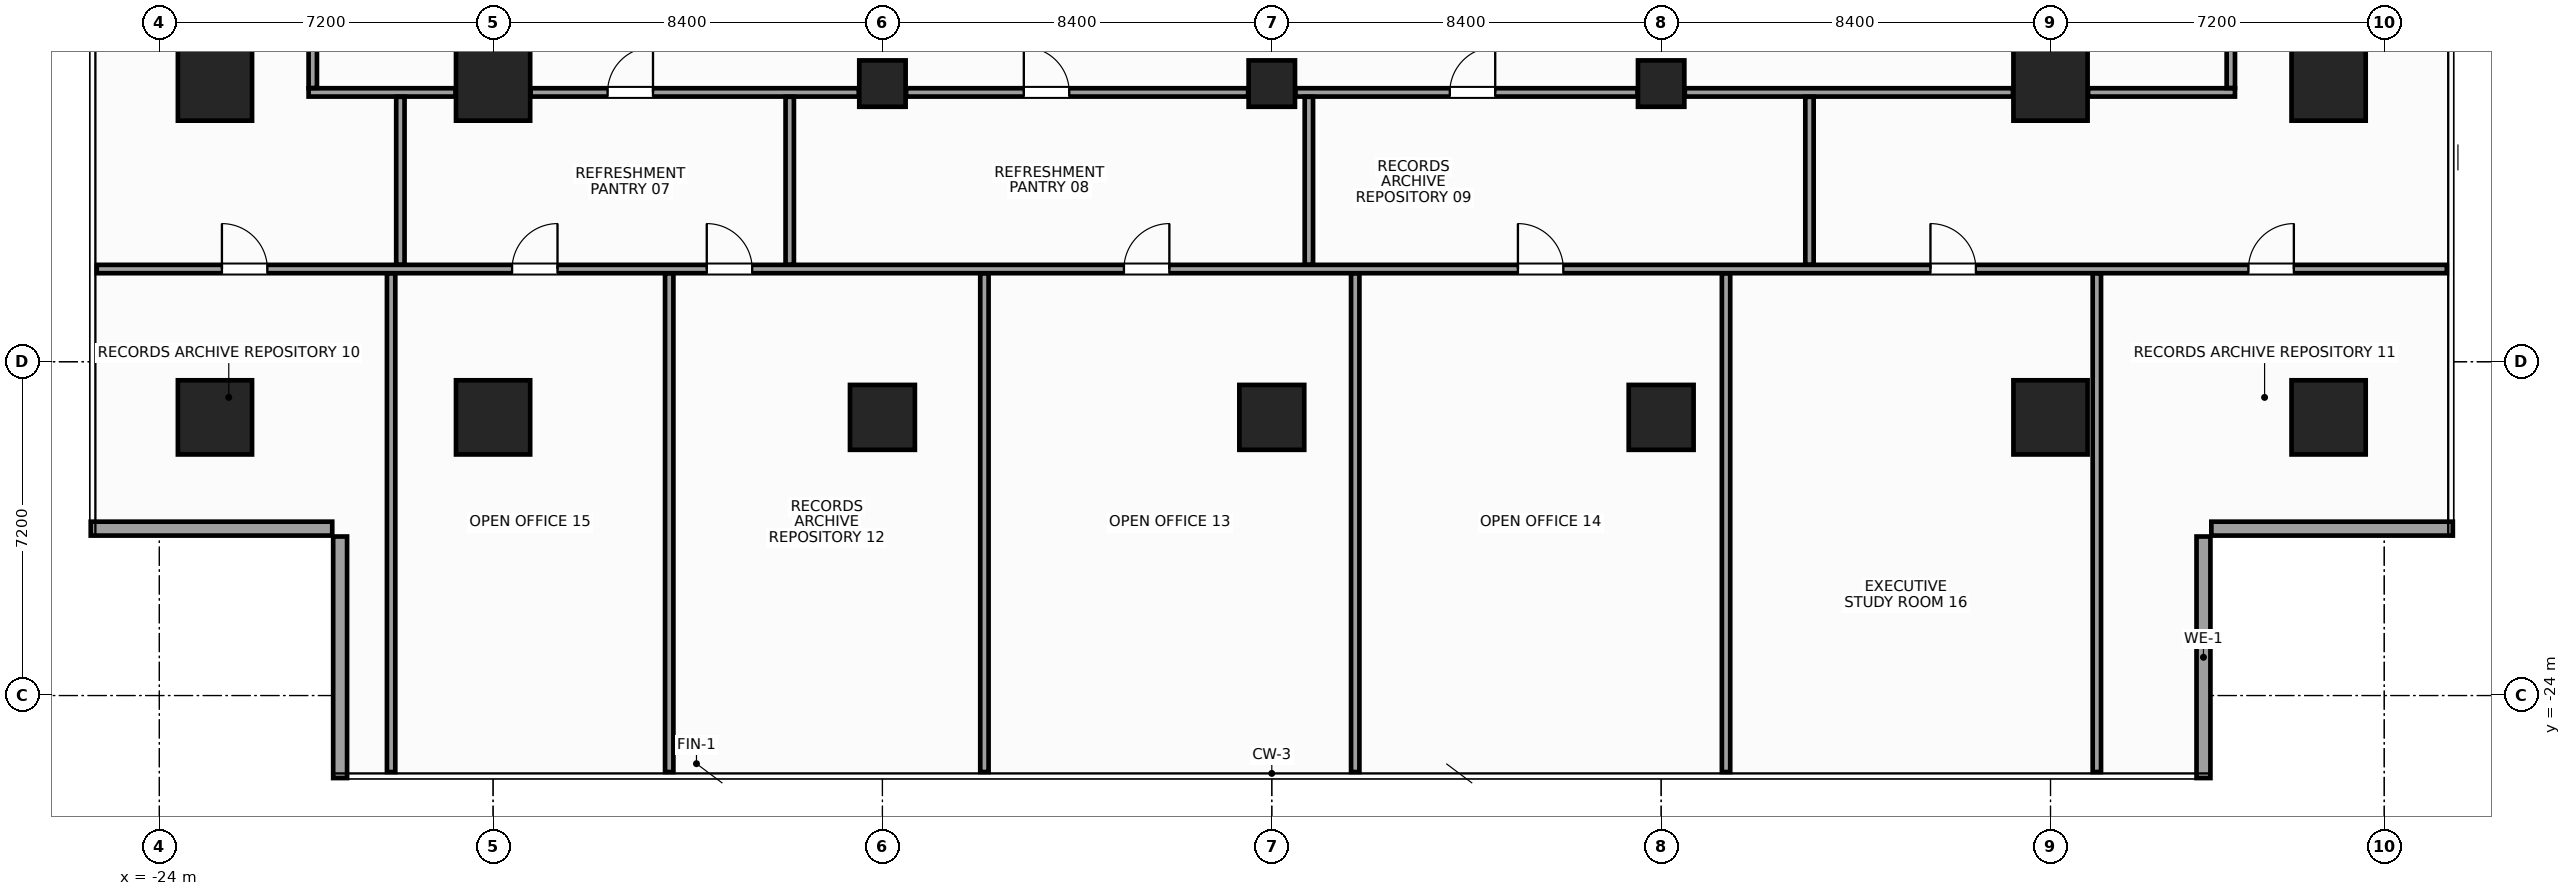
"""IFC4 building model, lengths in metres.
Left out: names, types, materials, properties, quantities, classifications, styles, units other than length and angle.
Written with IfcOpenShell. Run it as: python <this file> out.ifc"""

import sys

from ifc_helpers import new_model, si_unit, direction, frame, frame_2d, origin, origin_2d, place, context, subcontext, project, spatial, rectangle, hollow_rectangle, extrude, source, transform, mapped, element, fill, save


model = new_model("IFC4")
c1 = context("Model", 3, precision=1e-05, world=origin(), true_north=direction((0.0, 1.0)))
c2 = subcontext(c1, "Body", "Model", "MODEL_VIEW")
j1 = project(units=[si_unit("LENGTHUNIT", "METRE"), si_unit("PLANEANGLEUNIT", "RADIAN")], contexts=[c1])
p1 = place(None, origin())
s1 = spatial("IfcSite", under=j1, at=p1, CompositionType="ELEMENT")
p2 = place(p1, origin())
s2 = spatial("IfcBuilding", under=s1, at=p2, CompositionType="ELEMENT")
p3 = place(p2, frame((0.0, 0.0, 120.8)))
s3 = spatial("IfcBuildingStorey", under=s2, at=p3, CompositionType="ELEMENT", Elevation=120.8)
m1 = source(origin(), c2, "Body", "SweptSolid", [
    extrude(rectangle(XDim=1.6, YDim=1.6, at=origin_2d()), origin(), (0.0, 0.0, 1.0), 3.6),
])
for number, where, z_axis, x_axis in (
    (1, (-16.8, -18.0, 0.0), (0.0, 0.0, 1.0), (1.0, 0.0, 0.0)),
    (2, (-16.8, -10.8, 0.0), (0.0, 0.0, 1.0), (1.0, 0.0, 0.0)),
    (3, (16.8, -18.0, 0.0), (0.0, 0.0, 1.0), (1.0, 0.0, 0.0)),
    (4, (16.8, -10.8, 0.0), (0.0, 0.0, 1.0), (1.0, 0.0, 0.0)),
    (5, (-22.8, -18.0, 0.0), (0.0, 0.0, 1.0), (1.0, 0.0, 0.0)),
    (6, (-22.8, -10.8, 0.0), (0.0, 0.0, 1.0), (1.0, 0.0, 0.0)),
    (7, (22.8, -18.0, 0.0), (0.0, 0.0, 1.0), (1.0, 0.0, 0.0)),
    (8, (22.8, -10.8, 0.0), (0.0, 0.0, 1.0), (1.0, 0.0, 0.0)),
):
    element("IfcColumn", number, at=place(p3, frame(where, z_axis=z_axis, x_axis=x_axis)), inside=s3, PredefinedType="COLUMN", context=c2, shape_type="MappedRepresentation", body=[
        mapped(m1, transform((0.0, 0.0, 0.0), x_axis=(1.0, 0.0, 0.0), y_axis=(0.0, 1.0, 0.0), z_axis=(0.0, 0.0, 1.0), scale=1.0)),
    ])
m2 = source(origin(), c2, "Body", "SweptSolid", [
    extrude(rectangle(XDim=1.4, YDim=1.4, at=origin_2d()), origin(), (0.0, 0.0, 1.0), 3.6),
])
p4 = place(p3, frame((-8.4, -18.0, 0.0), z_axis=(0.0, 0.0, 1.0), x_axis=(1.0, 0.0, 0.0)))
e9 = element("IfcColumn", 9, at=p4, inside=s3, PredefinedType="COLUMN", context=c2, shape_type="MappedRepresentation", body=[
    mapped(m2, transform((0.0, 0.0, 0.0), x_axis=(1.0, 0.0, 0.0), y_axis=(0.0, 1.0, 0.0), z_axis=(0.0, 0.0, 1.0), scale=1.0)),
])
m3 = source(origin(), c2, "Body", "SweptSolid", [
    extrude(hollow_rectangle(XDim=1.0, YDim=1.0, WallThickness=0.045, at=origin_2d()), origin(), (0.0, 0.0, 1.0), 3.6),
])
p5 = place(p3, frame((-8.4, -10.8, 0.0), z_axis=(0.0, 0.0, 1.0), x_axis=(1.0, 0.0, 0.0)))
e10 = element("IfcColumn", 10, at=p5, inside=s3, PredefinedType="COLUMN", context=c2, shape_type="MappedRepresentation", body=[
    mapped(m3, transform((0.0, 0.0, 0.0), x_axis=(1.0, 0.0, 0.0), y_axis=(0.0, 1.0, 0.0), z_axis=(0.0, 0.0, 1.0), scale=1.0)),
])
p6 = place(p3, frame((8.4, -18.0, 0.0), z_axis=(0.0, 0.0, 1.0), x_axis=(1.0, 0.0, 0.0)))
e11 = element("IfcColumn", 11, at=p6, inside=s3, PredefinedType="COLUMN", context=c2, shape_type="MappedRepresentation", body=[
    mapped(m2, transform((0.0, 0.0, 0.0), x_axis=(1.0, 0.0, 0.0), y_axis=(0.0, 1.0, 0.0), z_axis=(0.0, 0.0, 1.0), scale=1.0)),
])
p7 = place(p3, frame((8.4, -10.8, 0.0), z_axis=(0.0, 0.0, 1.0), x_axis=(1.0, 0.0, 0.0)))
e12 = element("IfcColumn", 12, at=p7, inside=s3, PredefinedType="COLUMN", context=c2, shape_type="MappedRepresentation", body=[
    mapped(m3, transform((0.0, 0.0, 0.0), x_axis=(1.0, 0.0, 0.0), y_axis=(0.0, 1.0, 0.0), z_axis=(0.0, 0.0, 1.0), scale=1.0)),
])
p8 = place(p3, frame((0.0, -18.0, 0.0), z_axis=(0.0, 0.0, 1.0), x_axis=(1.0, 0.0, 0.0)))
e13 = element("IfcColumn", 13, at=p8, inside=s3, PredefinedType="COLUMN", context=c2, shape_type="MappedRepresentation", body=[
    mapped(m2, transform((0.0, 0.0, 0.0), x_axis=(1.0, 0.0, 0.0), y_axis=(0.0, 1.0, 0.0), z_axis=(0.0, 0.0, 1.0), scale=1.0)),
])
m4 = source(origin(), c2, "Body", "SweptSolid", [
    extrude(rectangle(XDim=1.0, YDim=1.0, at=origin_2d()), origin(), (0.0, 0.0, 1.0), 3.6),
])
p9 = place(p3, frame((0.0, -10.8, 0.0), z_axis=(0.0, 0.0, 1.0), x_axis=(1.0, 0.0, 0.0)))
e14 = element("IfcColumn", 14, at=p9, inside=s3, PredefinedType="COLUMN", context=c2, shape_type="MappedRepresentation", body=[
    mapped(m4, transform((0.0, 0.0, 0.0), x_axis=(1.0, 0.0, 0.0), y_axis=(0.0, 1.0, 0.0), z_axis=(0.0, 0.0, 1.0), scale=1.0)),
])
m5 = source(origin(), c2, "Body", "SweptSolid", [
    extrude(rectangle(XDim=5.21, YDim=0.3, at=frame_2d((2.605, 0.0))), origin(), (0.0, 0.0, 1.0), 2.68),
])
for number, where, z_axis, x_axis in (
    (15, (20.1, -25.78, 0.0), (0.0, 0.0, 1.0), (0.0, 1.0, 0.0)),
    (16, (20.27, -20.4, 0.0), (0.0, 0.0, 1.0), (1.0, 0.0, 0.0)),
    (17, (-25.48, -20.4, 0.0), (0.0, 0.0, 1.0), (1.0, 0.0, 0.0)),
    (18, (-20.1, -20.57, 0.0), (0.0, 0.0, 1.0), (0.0, -1.0, 0.0)),
):
    element("IfcWall", number, at=place(p3, frame(where, z_axis=z_axis, x_axis=x_axis)), inside=s3, PredefinedType="STANDARD", context=c2, shape_type="MappedRepresentation", body=[
        mapped(m5, transform((0.0, 0.0, 0.0), x_axis=(1.0, 0.0, 0.0), y_axis=(0.0, 1.0, 0.0), z_axis=(0.0, 0.0, 1.0), scale=1.0)),
    ])
m6 = source(origin(), c2, "Body", "SweptSolid", [
    extrude(rectangle(XDim=3.17, YDim=0.18, at=frame_2d((1.585, 0.0))), origin(), (0.0, 0.0, 1.0), 2.685),
])
p10 = place(p3, frame((-20.78, -10.99, 0.0), z_axis=(0.0, 0.0, 1.0), x_axis=(1.0, 0.0, 0.0)))
e19 = element("IfcWall", 19, at=p10, inside=s3, PredefinedType="PARTITIONING", context=c2, shape_type="MappedRepresentation", body=[
    mapped(m6, transform((0.0, 0.0, 0.0), x_axis=(1.0, 0.0, 0.0), y_axis=(0.0, 1.0, 0.0), z_axis=(0.0, 0.0, 1.0), scale=1.0)),
])
m7 = source(origin(), c2, "Body", "SweptSolid", [
    extrude(rectangle(XDim=7.08, YDim=0.18, at=frame_2d((3.54, 0.0))), origin(), (0.0, 0.0, 1.0), 2.685),
])
p11 = place(p3, frame((-15.99, -10.99, 0.0), z_axis=(0.0, 0.0, 1.0), x_axis=(1.0, 0.0, 0.0)))
e20 = element("IfcWall", 20, at=p11, inside=s3, PredefinedType="PARTITIONING", context=c2, shape_type="MappedRepresentation", body=[
    mapped(m7, transform((0.0, 0.0, 0.0), x_axis=(1.0, 0.0, 0.0), y_axis=(0.0, 1.0, 0.0), z_axis=(0.0, 0.0, 1.0), scale=1.0)),
])
p12 = place(p11, frame((1.66, 0.0, 0.0)))
e21 = element("IfcOpeningElement", 21, at=p12, cuts=e20, PredefinedType="OPENING", context=c2, shape_type="SweptSolid", body=[
    extrude(rectangle(XDim=0.98, YDim=2.15, at=frame_2d((0.49, 1.075))), frame((0.0, 0.102, 0.0), z_axis=(0.0, -1.0, 0.0), x_axis=(1.0, 0.0, 0.0)), (0.0, 0.0, 1.0), 0.204),
])
m8 = source(origin(), c2, "Body", "SweptSolid", [
    extrude(rectangle(XDim=7.38, YDim=0.18, at=frame_2d((3.69, 0.0))), origin(), (0.0, 0.0, 1.0), 2.685),
])
p13 = place(p3, frame((-7.89, -10.99, 0.0), z_axis=(0.0, 0.0, 1.0), x_axis=(1.0, 0.0, 0.0)))
e22 = element("IfcWall", 22, at=p13, inside=s3, PredefinedType="PARTITIONING", context=c2, shape_type="MappedRepresentation", body=[
    mapped(m8, transform((0.0, 0.0, 0.0), x_axis=(1.0, 0.0, 0.0), y_axis=(0.0, 1.0, 0.0), z_axis=(0.0, 0.0, 1.0), scale=1.0)),
])
p14 = place(p13, frame((2.54, 0.0, 0.0)))
e23 = element("IfcOpeningElement", 23, at=p14, cuts=e22, PredefinedType="OPENING", context=c2, shape_type="SweptSolid", body=[
    extrude(rectangle(XDim=0.98, YDim=2.15, at=frame_2d((0.49, 1.075))), frame((0.0, 0.102, 0.0), z_axis=(0.0, -1.0, 0.0), x_axis=(1.0, 0.0, 0.0)), (0.0, 0.0, 1.0), 0.204),
])
p15 = place(p3, frame((0.51, -10.99, 0.0), z_axis=(0.0, 0.0, 1.0), x_axis=(1.0, 0.0, 0.0)))
e24 = element("IfcWall", 24, at=p15, inside=s3, PredefinedType="PARTITIONING", context=c2, shape_type="MappedRepresentation", body=[
    mapped(m8, transform((0.0, 0.0, 0.0), x_axis=(1.0, 0.0, 0.0), y_axis=(0.0, 1.0, 0.0), z_axis=(0.0, 0.0, 1.0), scale=1.0)),
])
p16 = place(p15, frame((3.33, 0.0, 0.0)))
e25 = element("IfcOpeningElement", 25, at=p16, cuts=e24, PredefinedType="OPENING", context=c2, shape_type="SweptSolid", body=[
    extrude(rectangle(XDim=0.98, YDim=2.15, at=frame_2d((0.49, 1.075))), frame((0.0, 0.102, 0.0), z_axis=(0.0, -1.0, 0.0), x_axis=(1.0, 0.0, 0.0)), (0.0, 0.0, 1.0), 0.204),
])
p17 = place(p3, frame((8.91, -10.99, 0.0), z_axis=(0.0, 0.0, 1.0), x_axis=(1.0, 0.0, 0.0)))
e26 = element("IfcWall", 26, at=p17, inside=s3, PredefinedType="PARTITIONING", context=c2, shape_type="MappedRepresentation", body=[
    mapped(m7, transform((0.0, 0.0, 0.0), x_axis=(1.0, 0.0, 0.0), y_axis=(0.0, 1.0, 0.0), z_axis=(0.0, 0.0, 1.0), scale=1.0)),
])
p18 = place(p3, frame((17.61, -10.99, 0.0), z_axis=(0.0, 0.0, 1.0), x_axis=(1.0, 0.0, 0.0)))
e27 = element("IfcWall", 27, at=p18, inside=s3, PredefinedType="PARTITIONING", context=c2, shape_type="MappedRepresentation", body=[
    mapped(m6, transform((0.0, 0.0, 0.0), x_axis=(1.0, 0.0, 0.0), y_axis=(0.0, 1.0, 0.0), z_axis=(0.0, 0.0, 1.0), scale=1.0)),
])
m9 = source(origin(), c2, "Body", "SweptSolid", [
    extrude(rectangle(XDim=2.09, YDim=0.18, at=frame_2d((1.045, 0.0))), origin(), (0.0, 0.0, 1.0), 3.3),
])
for number, where, z_axis, x_axis in (
    (28, (-20.69, -10.895, 0.0), (0.0, 0.0, 1.0), (0.0, 1.0, 0.0)),
    (29, (20.69, -10.895, 0.0), (0.0, 0.0, 1.0), (0.0, 1.0, 0.0)),
):
    element("IfcWall", number, at=place(p3, frame(where, z_axis=z_axis, x_axis=x_axis)), inside=s3, PredefinedType="PARTITIONING", context=c2, shape_type="MappedRepresentation", body=[
        mapped(m9, transform((0.0, 0.0, 0.0), x_axis=(1.0, 0.0, 0.0), y_axis=(0.0, 1.0, 0.0), z_axis=(0.0, 0.0, 1.0), scale=1.0)),
    ])
m10 = source(origin(), c2, "Body", "SweptSolid", [
    extrude(rectangle(XDim=50.7, YDim=0.18, at=frame_2d((25.35, 0.0))), origin(), (0.0, 0.0, 1.0), 2.885),
])
p19 = place(p3, frame((-25.35, -14.8, 0.0), z_axis=(0.0, 0.0, 1.0), x_axis=(1.0, 0.0, 0.0)))
e30 = element("IfcWall", 30, at=p19, inside=s3, PredefinedType="PARTITIONING", context=c2, shape_type="MappedRepresentation", body=[
    mapped(m10, transform((0.0, 0.0, 0.0), x_axis=(1.0, 0.0, 0.0), y_axis=(0.0, 1.0, 0.0), z_axis=(0.0, 0.0, 1.0), scale=1.0)),
])
p20 = place(p19, frame((2.7, 0.0, 0.0)))
e31 = element("IfcOpeningElement", 31, at=p20, cuts=e30, PredefinedType="OPENING", context=c2, shape_type="SweptSolid", body=[
    extrude(rectangle(XDim=0.98, YDim=2.15, at=frame_2d((0.49, 1.075))), frame((0.0, 0.102, 0.0), z_axis=(0.0, -1.0, 0.0), x_axis=(1.0, 0.0, 0.0)), (0.0, 0.0, 1.0), 0.204),
])
p21 = place(p19, frame((46.42, 0.0, 0.0)))
e32 = element("IfcOpeningElement", 32, at=p21, cuts=e30, PredefinedType="OPENING", context=c2, shape_type="SweptSolid", body=[
    extrude(rectangle(XDim=0.98, YDim=2.15, at=frame_2d((0.49, 1.075))), frame((0.0, 0.102, 0.0), z_axis=(0.0, -1.0, 0.0), x_axis=(1.0, 0.0, 0.0)), (0.0, 0.0, 1.0), 0.204),
])
p22 = place(p19, frame((13.16, 0.0, 0.0)))
e33 = element("IfcOpeningElement", 33, at=p22, cuts=e30, PredefinedType="OPENING", context=c2, shape_type="SweptSolid", body=[
    extrude(rectangle(XDim=0.98, YDim=2.15, at=frame_2d((0.49, 1.075))), frame((0.0, 0.102, 0.0), z_axis=(0.0, -1.0, 0.0), x_axis=(1.0, 0.0, 0.0)), (0.0, 0.0, 1.0), 0.204),
])
p23 = place(p19, frame((22.16, 0.0, 0.0)))
e34 = element("IfcOpeningElement", 34, at=p23, cuts=e30, PredefinedType="OPENING", context=c2, shape_type="SweptSolid", body=[
    extrude(rectangle(XDim=0.98, YDim=2.15, at=frame_2d((0.49, 1.075))), frame((0.0, 0.102, 0.0), z_axis=(0.0, -1.0, 0.0), x_axis=(1.0, 0.0, 0.0)), (0.0, 0.0, 1.0), 0.204),
])
p24 = place(p19, frame((30.66, 0.0, 0.0)))
e35 = element("IfcOpeningElement", 35, at=p24, cuts=e30, PredefinedType="OPENING", context=c2, shape_type="SweptSolid", body=[
    extrude(rectangle(XDim=0.98, YDim=2.15, at=frame_2d((0.49, 1.075))), frame((0.0, 0.102, 0.0), z_axis=(0.0, -1.0, 0.0), x_axis=(1.0, 0.0, 0.0)), (0.0, 0.0, 1.0), 0.204),
])
p25 = place(p19, frame((8.96, 0.0, 0.0)))
e36 = element("IfcOpeningElement", 36, at=p25, cuts=e30, PredefinedType="OPENING", context=c2, shape_type="SweptSolid", body=[
    extrude(rectangle(XDim=0.98, YDim=2.15, at=frame_2d((0.49, 1.075))), frame((0.0, 0.102, 0.0), z_axis=(0.0, -1.0, 0.0), x_axis=(1.0, 0.0, 0.0)), (0.0, 0.0, 1.0), 0.204),
])
p26 = place(p19, frame((39.56, 0.0, 0.0)))
e37 = element("IfcOpeningElement", 37, at=p26, cuts=e30, PredefinedType="OPENING", context=c2, shape_type="SweptSolid", body=[
    extrude(rectangle(XDim=0.98, YDim=2.15, at=frame_2d((0.49, 1.075))), frame((0.0, 0.102, 0.0), z_axis=(0.0, -1.0, 0.0), x_axis=(1.0, 0.0, 0.0)), (0.0, 0.0, 1.0), 0.204),
])
m11 = source(origin(), c2, "Body", "SweptSolid", [
    extrude(rectangle(XDim=3.62, YDim=0.18, at=frame_2d((1.81, 0.0))), origin(), (0.0, 0.0, 1.0), 3.3),
])
for number, where, z_axis, x_axis in (
    (38, (-18.8, -14.705, 0.0), (0.0, 0.0, 1.0), (0.0, 1.0, 0.0)),
    (39, (-10.4, -14.705, 0.0), (0.0, 0.0, 1.0), (0.0, 1.0, 0.0)),
    (40, (0.8, -14.705, 0.0), (0.0, 0.0, 1.0), (0.0, 1.0, 0.0)),
    (41, (11.6, -14.705, 0.0), (0.0, 0.0, 1.0), (0.0, 1.0, 0.0)),
):
    element("IfcWall", number, at=place(p3, frame(where, z_axis=z_axis, x_axis=x_axis)), inside=s3, PredefinedType="PARTITIONING", context=c2, shape_type="MappedRepresentation", body=[
        mapped(m11, transform((0.0, 0.0, 0.0), x_axis=(1.0, 0.0, 0.0), y_axis=(0.0, 1.0, 0.0), z_axis=(0.0, 0.0, 1.0), scale=1.0)),
    ])
m12 = source(origin(), c2, "Body", "SweptSolid", [
    extrude(rectangle(XDim=10.755, YDim=0.18, at=frame_2d((5.377, 0.0))), origin(), (0.0, 0.0, 1.0), 2.685),
])
for number, where, z_axis, x_axis in (
    (42, (-19.0, -25.65, 0.0), (0.0, 0.0, 1.0), (0.0, 1.0, 0.0)),
    (43, (-13.0, -25.65, 0.0), (0.0, 0.0, 1.0), (0.0, 1.0, 0.0)),
    (44, (-6.2, -25.65, 0.0), (0.0, 0.0, 1.0), (0.0, 1.0, 0.0)),
    (45, (1.8, -25.65, 0.0), (0.0, 0.0, 1.0), (0.0, 1.0, 0.0)),
    (46, (9.8, -25.65, 0.0), (0.0, 0.0, 1.0), (0.0, 1.0, 0.0)),
    (47, (17.8, -25.65, 0.0), (0.0, 0.0, 1.0), (0.0, 1.0, 0.0)),
):
    element("IfcWall", number, at=place(p3, frame(where, z_axis=z_axis, x_axis=x_axis)), inside=s3, PredefinedType="PARTITIONING", context=c2, shape_type="MappedRepresentation", body=[
        mapped(m12, transform((0.0, 0.0, 0.0), x_axis=(1.0, 0.0, 0.0), y_axis=(0.0, 1.0, 0.0), z_axis=(0.0, 0.0, 1.0), scale=1.0)),
    ])
m13 = source(origin(), c2, "Body", "SweptSolid", [
    extrude(rectangle(XDim=0.98, YDim=2.15, at=frame_2d((0.49, 1.075))), frame((0.0, 0.025, 0.0), z_axis=(0.0, -1.0, 0.0), x_axis=(1.0, 0.0, 0.0)), (0.0, 0.0, 1.0), 0.05),
])
p27 = place(p12, origin())
e48 = element("IfcDoor", 48, at=p27, inside=s3, OperationType="SINGLE_SWING_RIGHT", PredefinedType="DOOR", context=c2, shape_type="MappedRepresentation", body=[
    mapped(m13, transform((0.0, 0.0, 0.0), x_axis=(1.0, 0.0, 0.0), y_axis=(0.0, 1.0, 0.0), z_axis=(0.0, 0.0, 1.0), scale=1.0)),
])
fill(e21, e48)
p28 = place(p14, origin())
e49 = element("IfcDoor", 49, at=p28, inside=s3, OperationType="SINGLE_SWING_LEFT", PredefinedType="DOOR", context=c2, shape_type="MappedRepresentation", body=[
    mapped(m13, transform((0.0, 0.0, 0.0), x_axis=(1.0, 0.0, 0.0), y_axis=(0.0, 1.0, 0.0), z_axis=(0.0, 0.0, 1.0), scale=1.0)),
])
fill(e23, e49)
p29 = place(p16, origin())
e50 = element("IfcDoor", 50, at=p29, inside=s3, OperationType="SINGLE_SWING_RIGHT", PredefinedType="DOOR", context=c2, shape_type="MappedRepresentation", body=[
    mapped(m13, transform((0.0, 0.0, 0.0), x_axis=(1.0, 0.0, 0.0), y_axis=(0.0, 1.0, 0.0), z_axis=(0.0, 0.0, 1.0), scale=1.0)),
])
fill(e25, e50)
p30 = place(p20, origin())
e51 = element("IfcDoor", 51, at=p30, inside=s3, OperationType="SINGLE_SWING_LEFT", PredefinedType="DOOR", context=c2, shape_type="MappedRepresentation", body=[
    mapped(m13, transform((0.0, 0.0, 0.0), x_axis=(1.0, 0.0, 0.0), y_axis=(0.0, 1.0, 0.0), z_axis=(0.0, 0.0, 1.0), scale=1.0)),
])
fill(e31, e51)
p31 = place(p21, origin())
e52 = element("IfcDoor", 52, at=p31, inside=s3, OperationType="SINGLE_SWING_RIGHT", PredefinedType="DOOR", context=c2, shape_type="MappedRepresentation", body=[
    mapped(m13, transform((0.0, 0.0, 0.0), x_axis=(1.0, 0.0, 0.0), y_axis=(0.0, 1.0, 0.0), z_axis=(0.0, 0.0, 1.0), scale=1.0)),
])
fill(e32, e52)
p32 = place(p22, origin())
e53 = element("IfcDoor", 53, at=p32, inside=s3, OperationType="SINGLE_SWING_LEFT", PredefinedType="DOOR", context=c2, shape_type="MappedRepresentation", body=[
    mapped(m13, transform((0.0, 0.0, 0.0), x_axis=(1.0, 0.0, 0.0), y_axis=(0.0, 1.0, 0.0), z_axis=(0.0, 0.0, 1.0), scale=1.0)),
])
fill(e33, e53)
p33 = place(p23, origin())
e54 = element("IfcDoor", 54, at=p33, inside=s3, OperationType="SINGLE_SWING_RIGHT", PredefinedType="DOOR", context=c2, shape_type="MappedRepresentation", body=[
    mapped(m13, transform((0.0, 0.0, 0.0), x_axis=(1.0, 0.0, 0.0), y_axis=(0.0, 1.0, 0.0), z_axis=(0.0, 0.0, 1.0), scale=1.0)),
])
fill(e34, e54)
p34 = place(p24, origin())
e55 = element("IfcDoor", 55, at=p34, inside=s3, OperationType="SINGLE_SWING_LEFT", PredefinedType="DOOR", context=c2, shape_type="MappedRepresentation", body=[
    mapped(m13, transform((0.0, 0.0, 0.0), x_axis=(1.0, 0.0, 0.0), y_axis=(0.0, 1.0, 0.0), z_axis=(0.0, 0.0, 1.0), scale=1.0)),
])
fill(e35, e55)
p35 = place(p25, origin())
e56 = element("IfcDoor", 56, at=p35, inside=s3, OperationType="SINGLE_SWING_RIGHT", PredefinedType="DOOR", context=c2, shape_type="MappedRepresentation", body=[
    mapped(m13, transform((0.0, 0.0, 0.0), x_axis=(1.0, 0.0, 0.0), y_axis=(0.0, 1.0, 0.0), z_axis=(0.0, 0.0, 1.0), scale=1.0)),
])
fill(e36, e56)
p36 = place(p26, origin())
e57 = element("IfcDoor", 57, at=p36, inside=s3, OperationType="SINGLE_SWING_LEFT", PredefinedType="DOOR", context=c2, shape_type="MappedRepresentation", body=[
    mapped(m13, transform((0.0, 0.0, 0.0), x_axis=(1.0, 0.0, 0.0), y_axis=(0.0, 1.0, 0.0), z_axis=(0.0, 0.0, 1.0), scale=1.0)),
])
fill(e37, e57)
save(model, sys.argv[1])
